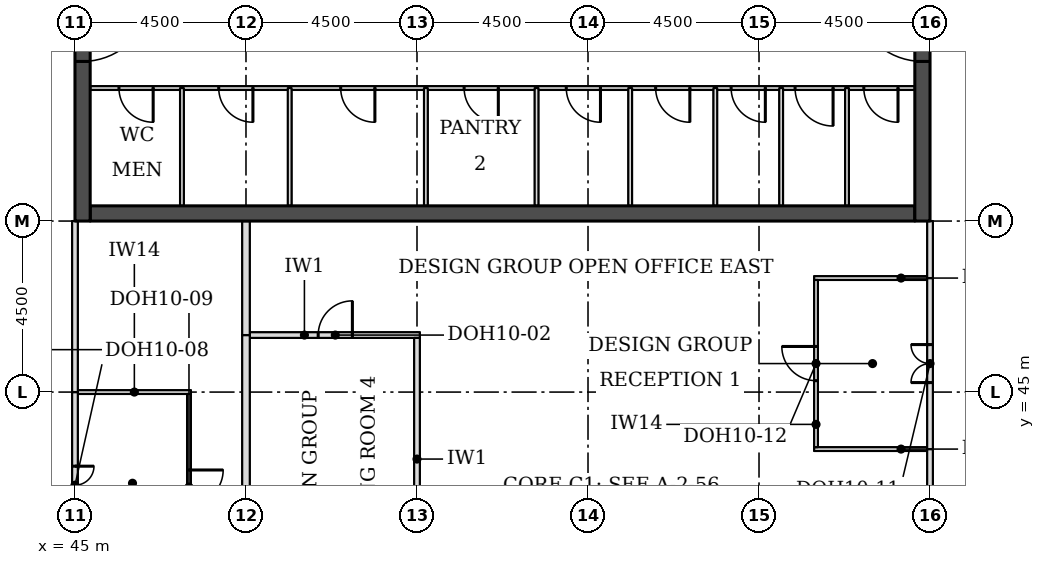
"""IFC4 building model, lengths in metres.
Left out: names, types, materials, properties, quantities, classifications, styles, units other than length and angle.
Written with IfcOpenShell. Run it as: python <this file> out.ifc"""

import sys

from ifc_helpers import new_model, si_unit, direction, frame, frame_2d, origin, place, context, subcontext, project, spatial, rectangle, extrude, element, fill, save


model = new_model("IFC4")
c1 = context("Model", 3, precision=1e-05, world=origin(), true_north=direction((0.0, 1.0)))
c2 = subcontext(c1, "Body", "Model", "MODEL_VIEW")
j1 = project(units=[si_unit("LENGTHUNIT", "METRE"), si_unit("PLANEANGLEUNIT", "RADIAN")], contexts=[c1])
p1 = place(None, origin())
s1 = spatial("IfcSite", under=j1, at=p1, CompositionType="ELEMENT")
p2 = place(p1, origin())
s2 = spatial("IfcBuilding", under=s1, at=p2, CompositionType="ELEMENT")
p3 = place(p2, frame((0.0, 0.0, 226.7)))
s3 = spatial("IfcBuildingStorey", under=s2, at=p3, CompositionType="ELEMENT", Elevation=226.7)
p4 = place(p3, frame((45.4, 49.7, 0.0), z_axis=(0.0, 0.0, 1.0), x_axis=(1.0, 0.0, 0.0)))
e1 = element("IfcWall", 1, at=p4, inside=s3, PredefinedType="SHEAR", context=c2, shape_type="SweptSolid", body=[
    extrude(rectangle(XDim=21.7, YDim=0.4, at=frame_2d((10.85, 0.0))), origin(), (0.0, 0.0, 1.0), 3.7),
])
p5 = place(p3, frame((45.2, 49.5, 0.0), z_axis=(0.0, 0.0, 1.0), x_axis=(0.0, 1.0, 0.0)))
e2 = element("IfcWall", 2, at=p5, inside=s3, PredefinedType="SHEAR", context=c2, shape_type="SweptSolid", body=[
    extrude(rectangle(XDim=22.5, YDim=0.4, at=frame_2d((11.25, 0.0))), origin(), (0.0, 0.0, 1.0), 3.7),
])
p6 = place(p5, frame((4.2, 0.0, 0.0)))
e3 = element("IfcOpeningElement", 3, at=p6, cuts=e2, PredefinedType="OPENING", context=c2, shape_type="SweptSolid", body=[
    extrude(rectangle(XDim=1.8, YDim=2.1, at=frame_2d((0.9, 1.05))), frame((0.0, 0.21, 0.0), z_axis=(0.0, -1.0, 0.0), x_axis=(1.0, 0.0, 0.0)), (0.0, 0.0, 1.0), 0.42),
])
p7 = place(p5, frame((6.9, 0.0, 0.0)))
e4 = element("IfcOpeningElement", 4, at=p7, cuts=e2, PredefinedType="OPENING", context=c2, shape_type="SweptSolid", body=[
    extrude(rectangle(XDim=1.1, YDim=2.1, at=frame_2d((0.55, 1.05))), frame((0.0, 0.21, 0.0), z_axis=(0.0, -1.0, 0.0), x_axis=(1.0, 0.0, 0.0)), (0.0, 0.0, 1.0), 0.42),
])
p8 = place(p5, frame((13.6, 0.0, 0.0)))
e5 = element("IfcOpeningElement", 5, at=p8, cuts=e2, PredefinedType="OPENING", context=c2, shape_type="SweptSolid", body=[
    extrude(rectangle(XDim=1.1, YDim=2.1, at=frame_2d((0.55, 1.05))), frame((0.0, 0.21, 0.0), z_axis=(0.0, -1.0, 0.0), x_axis=(1.0, 0.0, 0.0)), (0.0, 0.0, 1.0), 0.42),
])
p9 = place(p5, frame((16.5, 0.0, 0.0)))
e6 = element("IfcOpeningElement", 6, at=p9, cuts=e2, PredefinedType="OPENING", context=c2, shape_type="SweptSolid", body=[
    extrude(rectangle(XDim=1.8, YDim=2.1, at=frame_2d((0.9, 1.05))), frame((0.0, 0.21, 0.0), z_axis=(0.0, -1.0, 0.0), x_axis=(1.0, 0.0, 0.0)), (0.0, 0.0, 1.0), 0.42),
])
p10 = place(p3, frame((67.3, 49.5, 0.0), z_axis=(0.0, 0.0, 1.0), x_axis=(0.0, 1.0, 0.0)))
e7 = element("IfcWall", 7, at=p10, inside=s3, PredefinedType="SHEAR", context=c2, shape_type="SweptSolid", body=[
    extrude(rectangle(XDim=22.5, YDim=0.4, at=frame_2d((11.25, 0.0))), origin(), (0.0, 0.0, 1.0), 3.7),
])
p11 = place(p10, frame((4.2, 0.0, 0.0)))
e8 = element("IfcOpeningElement", 8, at=p11, cuts=e7, PredefinedType="OPENING", context=c2, shape_type="SweptSolid", body=[
    extrude(rectangle(XDim=1.8, YDim=2.1, at=frame_2d((0.9, 1.05))), frame((0.0, 0.21, 0.0), z_axis=(0.0, -1.0, 0.0), x_axis=(1.0, 0.0, 0.0)), (0.0, 0.0, 1.0), 0.42),
])
p12 = place(p10, frame((6.9, 0.0, 0.0)))
e9 = element("IfcOpeningElement", 9, at=p12, cuts=e7, PredefinedType="OPENING", context=c2, shape_type="SweptSolid", body=[
    extrude(rectangle(XDim=1.1, YDim=2.1, at=frame_2d((0.55, 1.05))), frame((0.0, 0.21, 0.0), z_axis=(0.0, -1.0, 0.0), x_axis=(1.0, 0.0, 0.0)), (0.0, 0.0, 1.0), 0.42),
])
p13 = place(p10, frame((13.6, 0.0, 0.0)))
e10 = element("IfcOpeningElement", 10, at=p13, cuts=e7, PredefinedType="OPENING", context=c2, shape_type="SweptSolid", body=[
    extrude(rectangle(XDim=1.1, YDim=2.1, at=frame_2d((0.55, 1.05))), frame((0.0, 0.21, 0.0), z_axis=(0.0, -1.0, 0.0), x_axis=(1.0, 0.0, 0.0)), (0.0, 0.0, 1.0), 0.42),
])
p14 = place(p10, frame((16.5, 0.0, 0.0)))
e11 = element("IfcOpeningElement", 11, at=p14, cuts=e7, PredefinedType="OPENING", context=c2, shape_type="SweptSolid", body=[
    extrude(rectangle(XDim=1.8, YDim=2.1, at=frame_2d((0.9, 1.05))), frame((0.0, 0.21, 0.0), z_axis=(0.0, -1.0, 0.0), x_axis=(1.0, 0.0, 0.0)), (0.0, 0.0, 1.0), 0.42),
])
for number, where, z_axis, x_axis in (
    (12, (64.45, 43.5, 0.0), (0.0, 0.0, 1.0), (1.0, 0.0, 0.0)),
    (13, (45.075, 45.0, 0.0), (0.0, 0.0, 1.0), (1.0, 0.0, 0.0)),
):
    element("IfcWall", number, at=place(p3, frame(where, z_axis=z_axis, x_axis=x_axis)), inside=s3, PredefinedType="PARTITIONING", context=c2, shape_type="SweptSolid", body=[
        extrude(rectangle(XDim=2.975, YDim=0.1, at=frame_2d((1.488, 0.0))), origin(), (0.0, 0.0, 1.0), 3.55),
    ])
p15 = place(p3, frame((49.6, 46.5, 0.0), z_axis=(0.0, 0.0, 1.0), x_axis=(1.0, 0.0, 0.0)))
e14 = element("IfcWall", 14, at=p15, inside=s3, PredefinedType="PARTITIONING", context=c2, shape_type="SweptSolid", body=[
    extrude(rectangle(XDim=4.475, YDim=0.15, at=frame_2d((2.237, 0.0))), origin(), (0.0, 0.0, 1.0), 3.55),
])
p16 = place(p15, frame((1.8, 0.0, 0.0)))
e15 = element("IfcOpeningElement", 15, at=p16, cuts=e14, PredefinedType="OPENING", context=c2, shape_type="SweptSolid", body=[
    extrude(rectangle(XDim=0.9, YDim=2.1, at=frame_2d((0.45, 1.05))), frame((0.0, 0.085, 0.0), z_axis=(0.0, -1.0, 0.0), x_axis=(1.0, 0.0, 0.0)), (0.0, 0.0, 1.0), 0.17),
])
p17 = place(p3, frame((64.45, 48.0, 0.0), z_axis=(0.0, 0.0, 1.0), x_axis=(1.0, 0.0, 0.0)))
e16 = element("IfcWall", 16, at=p17, inside=s3, PredefinedType="PARTITIONING", context=c2, shape_type="SweptSolid", body=[
    extrude(rectangle(XDim=2.975, YDim=0.1, at=frame_2d((1.488, 0.0))), origin(), (0.0, 0.0, 1.0), 3.55),
])
p18 = place(p3, frame((45.0, 40.05, 0.0), z_axis=(0.0, 0.0, 1.0), x_axis=(0.0, 1.0, 0.0)))
e17 = element("IfcWall", 17, at=p18, inside=s3, PredefinedType="PARTITIONING", context=c2, shape_type="SweptSolid", body=[
    extrude(rectangle(XDim=4.95, YDim=0.15, at=frame_2d((2.475, 0.0))), origin(), (0.0, 0.0, 1.0), 3.022),
])
p19 = place(p18, frame((2.0, 0.0, 0.0)))
e18 = element("IfcOpeningElement", 18, at=p19, cuts=e17, PredefinedType="OPENING", context=c2, shape_type="SweptSolid", body=[
    extrude(rectangle(XDim=1.0, YDim=2.1, at=frame_2d((0.5, 1.05))), frame((0.0, 0.085, 0.0), z_axis=(0.0, -1.0, 0.0), x_axis=(1.0, 0.0, 0.0)), (0.0, 0.0, 1.0), 0.17),
])
p20 = place(p3, frame((48.0, 40.05, 0.0), z_axis=(0.0, 0.0, 1.0), x_axis=(0.0, 1.0, 0.0)))
e19 = element("IfcWall", 19, at=p20, inside=s3, PredefinedType="PARTITIONING", context=c2, shape_type="SweptSolid", body=[
    extrude(rectangle(XDim=4.9, YDim=0.1, at=frame_2d((2.45, 0.0))), origin(), (0.0, 0.0, 1.0), 3.55),
])
p21 = place(p20, frame((2.0, 0.0, 0.0)))
e20 = element("IfcOpeningElement", 20, at=p21, cuts=e19, PredefinedType="OPENING", context=c2, shape_type="SweptSolid", body=[
    extrude(rectangle(XDim=0.9, YDim=2.1, at=frame_2d((0.45, 1.05))), frame((0.0, 0.06, 0.0), z_axis=(0.0, -1.0, 0.0), x_axis=(1.0, 0.0, 0.0)), (0.0, 0.0, 1.0), 0.12),
])
p22 = place(p3, frame((49.5, 40.05, 0.0), z_axis=(0.0, 0.0, 1.0), x_axis=(0.0, 1.0, 0.0)))
e21 = element("IfcWall", 21, at=p22, inside=s3, PredefinedType="PARTITIONING", context=c2, shape_type="SweptSolid", body=[
    extrude(rectangle(XDim=6.45, YDim=0.2, at=frame_2d((3.225, 0.0))), origin(), (0.0, 0.0, 1.0), 3.55),
])
p23 = place(p3, frame((54.0, 40.05, 0.0), z_axis=(0.0, 0.0, 1.0), x_axis=(0.0, 1.0, 0.0)))
e22 = element("IfcWall", 22, at=p23, inside=s3, PredefinedType="PARTITIONING", context=c2, shape_type="SweptSolid", body=[
    extrude(rectangle(XDim=6.375, YDim=0.15, at=frame_2d((3.188, 0.0))), origin(), (0.0, 0.0, 1.0), 3.55),
])
p24 = place(p3, frame((67.5, 40.05, 0.0), z_axis=(0.0, 0.0, 1.0), x_axis=(0.0, 1.0, 0.0)))
e23 = element("IfcWall", 23, at=p24, inside=s3, PredefinedType="PARTITIONING", context=c2, shape_type="SweptSolid", body=[
    extrude(rectangle(XDim=3.45, YDim=0.15, at=frame_2d((1.725, 0.0))), origin(), (0.0, 0.0, 1.0), 3.022),
])
p25 = place(p3, frame((67.5, 43.5, 0.0), z_axis=(0.0, 0.0, 1.0), x_axis=(0.0, 1.0, 0.0)))
e24 = element("IfcWall", 24, at=p25, inside=s3, PredefinedType="PARTITIONING", context=c2, shape_type="SweptSolid", body=[
    extrude(rectangle(XDim=4.5, YDim=0.15, at=frame_2d((2.25, 0.0))), origin(), (0.0, 0.0, 1.0), 3.022),
])
p26 = place(p25, frame((1.75, 0.0, 0.0)))
e25 = element("IfcOpeningElement", 25, at=p26, cuts=e24, PredefinedType="OPENING", context=c2, shape_type="SweptSolid", body=[
    extrude(rectangle(XDim=1.0, YDim=2.1, at=frame_2d((0.5, 1.05))), frame((0.0, 0.085, 0.0), z_axis=(0.0, -1.0, 0.0), x_axis=(1.0, 0.0, 0.0)), (0.0, 0.0, 1.0), 0.17),
])
p27 = place(p3, frame((64.5, 43.55, 0.0), z_axis=(0.0, 0.0, 1.0), x_axis=(0.0, 1.0, 0.0)))
e26 = element("IfcWall", 26, at=p27, inside=s3, PredefinedType="PARTITIONING", context=c2, shape_type="SweptSolid", body=[
    extrude(rectangle(XDim=4.4, YDim=0.1, at=frame_2d((2.2, 0.0))), origin(), (0.0, 0.0, 1.0), 3.55),
])
p28 = place(p27, frame((1.75, 0.0, 0.0)))
e27 = element("IfcOpeningElement", 27, at=p28, cuts=e26, PredefinedType="OPENING", context=c2, shape_type="SweptSolid", body=[
    extrude(rectangle(XDim=0.9, YDim=2.1, at=frame_2d((0.45, 1.05))), frame((0.0, 0.06, 0.0), z_axis=(0.0, -1.0, 0.0), x_axis=(1.0, 0.0, 0.0)), (0.0, 0.0, 1.0), 0.12),
])
p29 = place(p3, frame((45.0, 45.0, 0.0), z_axis=(0.0, 0.0, 1.0), x_axis=(0.0, 1.0, 0.0)))
e28 = element("IfcWall", 28, at=p29, inside=s3, PredefinedType="PARTITIONING", context=c2, shape_type="SweptSolid", body=[
    extrude(rectangle(XDim=4.5, YDim=0.15, at=frame_2d((2.25, 0.0))), origin(), (0.0, 0.0, 1.0), 3.022),
])
p30 = place(p3, frame((49.5, 46.5, 0.0), z_axis=(0.0, 0.0, 1.0), x_axis=(0.0, 1.0, 0.0)))
e29 = element("IfcWall", 29, at=p30, inside=s3, PredefinedType="PARTITIONING", context=c2, shape_type="SweptSolid", body=[
    extrude(rectangle(XDim=3.0, YDim=0.2, at=frame_2d((1.5, 0.0))), origin(), (0.0, 0.0, 1.0), 3.55),
])
p31 = place(p3, frame((67.5, 48.0, 0.0), z_axis=(0.0, 0.0, 1.0), x_axis=(0.0, 1.0, 0.0)))
e30 = element("IfcWall", 30, at=p31, inside=s3, PredefinedType="PARTITIONING", context=c2, shape_type="SweptSolid", body=[
    extrude(rectangle(XDim=1.5, YDim=0.15, at=frame_2d((0.75, 0.0))), origin(), (0.0, 0.0, 1.0), 3.022),
])
p32 = place(p3, frame((45.4, 53.0, 0.0), z_axis=(0.0, 0.0, 1.0), x_axis=(1.0, 0.0, 0.0)))
e31 = element("IfcWall", 31, at=p32, inside=s3, PredefinedType="PARTITIONING", context=c2, shape_type="SweptSolid", body=[
    extrude(rectangle(XDim=21.7, YDim=0.1, at=frame_2d((10.85, 0.0))), origin(), (0.0, 0.0, 1.0), 3.55),
])
p33 = place(p32, frame((20.357, 0.0, 0.0)))
e32 = element("IfcOpeningElement", 32, at=p33, cuts=e31, PredefinedType="OPENING", context=c2, shape_type="SweptSolid", body=[
    extrude(rectangle(XDim=0.9, YDim=2.1, at=frame_2d((0.45, 1.05))), frame((0.0, 0.06, 0.0), z_axis=(0.0, -1.0, 0.0), x_axis=(1.0, 0.0, 0.0)), (0.0, 0.0, 1.0), 0.12),
])
p34 = place(p32, frame((18.549, 0.0, 0.0)))
e33 = element("IfcOpeningElement", 33, at=p34, cuts=e31, PredefinedType="OPENING", context=c2, shape_type="SweptSolid", body=[
    extrude(rectangle(XDim=1.0, YDim=2.1, at=frame_2d((0.5, 1.05))), frame((0.0, 0.06, 0.0), z_axis=(0.0, -1.0, 0.0), x_axis=(1.0, 0.0, 0.0)), (0.0, 0.0, 1.0), 0.12),
])
p35 = place(p32, frame((16.866, 0.0, 0.0)))
e34 = element("IfcOpeningElement", 34, at=p35, cuts=e31, PredefinedType="OPENING", context=c2, shape_type="SweptSolid", body=[
    extrude(rectangle(XDim=0.9, YDim=2.1, at=frame_2d((0.45, 1.05))), frame((0.0, 0.06, 0.0), z_axis=(0.0, -1.0, 0.0), x_axis=(1.0, 0.0, 0.0)), (0.0, 0.0, 1.0), 0.12),
])
p36 = place(p32, frame((0.758, 0.0, 0.0)))
e35 = element("IfcOpeningElement", 35, at=p36, cuts=e31, PredefinedType="OPENING", context=c2, shape_type="SweptSolid", body=[
    extrude(rectangle(XDim=0.9, YDim=2.1, at=frame_2d((0.45, 1.05))), frame((0.0, 0.06, 0.0), z_axis=(0.0, -1.0, 0.0), x_axis=(1.0, 0.0, 0.0)), (0.0, 0.0, 1.0), 0.12),
])
p37 = place(p32, frame((3.383, 0.0, 0.0)))
e36 = element("IfcOpeningElement", 36, at=p37, cuts=e31, PredefinedType="OPENING", context=c2, shape_type="SweptSolid", body=[
    extrude(rectangle(XDim=0.9, YDim=2.1, at=frame_2d((0.45, 1.05))), frame((0.0, 0.06, 0.0), z_axis=(0.0, -1.0, 0.0), x_axis=(1.0, 0.0, 0.0)), (0.0, 0.0, 1.0), 0.12),
])
p38 = place(p32, frame((6.592, 0.0, 0.0)))
e37 = element("IfcOpeningElement", 37, at=p38, cuts=e31, PredefinedType="OPENING", context=c2, shape_type="SweptSolid", body=[
    extrude(rectangle(XDim=0.9, YDim=2.1, at=frame_2d((0.45, 1.05))), frame((0.0, 0.06, 0.0), z_axis=(0.0, -1.0, 0.0), x_axis=(1.0, 0.0, 0.0)), (0.0, 0.0, 1.0), 0.12),
])
p39 = place(p32, frame((9.84, 0.0, 0.0)))
e38 = element("IfcOpeningElement", 38, at=p39, cuts=e31, PredefinedType="OPENING", context=c2, shape_type="SweptSolid", body=[
    extrude(rectangle(XDim=0.9, YDim=2.1, at=frame_2d((0.45, 1.05))), frame((0.0, 0.06, 0.0), z_axis=(0.0, -1.0, 0.0), x_axis=(1.0, 0.0, 0.0)), (0.0, 0.0, 1.0), 0.12),
])
p40 = place(p32, frame((12.528, 0.0, 0.0)))
e39 = element("IfcOpeningElement", 39, at=p40, cuts=e31, PredefinedType="OPENING", context=c2, shape_type="SweptSolid", body=[
    extrude(rectangle(XDim=0.9, YDim=2.1, at=frame_2d((0.45, 1.05))), frame((0.0, 0.06, 0.0), z_axis=(0.0, -1.0, 0.0), x_axis=(1.0, 0.0, 0.0)), (0.0, 0.0, 1.0), 0.12),
])
p41 = place(p32, frame((14.88, 0.0, 0.0)))
e40 = element("IfcOpeningElement", 40, at=p41, cuts=e31, PredefinedType="OPENING", context=c2, shape_type="SweptSolid", body=[
    extrude(rectangle(XDim=0.9, YDim=2.1, at=frame_2d((0.45, 1.05))), frame((0.0, 0.06, 0.0), z_axis=(0.0, -1.0, 0.0), x_axis=(1.0, 0.0, 0.0)), (0.0, 0.0, 1.0), 0.12),
])
for number, where, z_axis, x_axis in (
    (41, (47.815, 49.9, 0.0), (0.0, 0.0, 1.0), (0.0, 1.0, 0.0)),
    (42, (50.65, 49.9, 0.0), (0.0, 0.0, 1.0), (0.0, 1.0, 0.0)),
    (43, (54.234, 49.9, 0.0), (0.0, 0.0, 1.0), (0.0, 1.0, 0.0)),
    (44, (57.146, 49.9, 0.0), (0.0, 0.0, 1.0), (0.0, 1.0, 0.0)),
    (45, (59.61, 49.9, 0.0), (0.0, 0.0, 1.0), (0.0, 1.0, 0.0)),
    (46, (61.85, 49.9, 0.0), (0.0, 0.0, 1.0), (0.0, 1.0, 0.0)),
    (47, (63.583, 49.9, 0.0), (0.0, 0.0, 1.0), (0.0, 1.0, 0.0)),
    (48, (65.315, 49.9, 0.0), (0.0, 0.0, 1.0), (0.0, 1.0, 0.0)),
):
    element("IfcWall", number, at=place(p3, frame(where, z_axis=z_axis, x_axis=x_axis)), inside=s3, PredefinedType="PARTITIONING", context=c2, shape_type="SweptSolid", body=[
        extrude(rectangle(XDim=3.1, YDim=0.1, at=frame_2d((1.55, 0.0))), origin(), (0.0, 0.0, 1.0), 3.55),
    ])
p42 = place(p19, frame((1.0, 0.0, 0.0), z_axis=(0.0, 0.0, 1.0), x_axis=(-1.0, 0.0, 0.0)))
e49 = element("IfcDoor", 49, at=p42, inside=s3, OperationType="DOUBLE_DOOR_SINGLE_SWING", PredefinedType="DOOR", context=c2, shape_type="SweptSolid", body=[
    extrude(rectangle(XDim=1.0, YDim=2.1, at=frame_2d((0.5, 1.05))), frame((0.0, 0.025, 0.0), z_axis=(0.0, -1.0, 0.0), x_axis=(1.0, 0.0, 0.0)), (0.0, 0.0, 1.0), 0.05),
])
fill(e18, e49)
p43 = place(p21, frame((0.9, 0.0, 0.0), z_axis=(0.0, 0.0, 1.0), x_axis=(-1.0, 0.0, 0.0)))
e50 = element("IfcDoor", 50, at=p43, inside=s3, OperationType="SINGLE_SWING_LEFT", PredefinedType="DOOR", context=c2, shape_type="SweptSolid", body=[
    extrude(rectangle(XDim=0.9, YDim=2.1, at=frame_2d((0.45, 1.05))), frame((0.0, 0.025, 0.0), z_axis=(0.0, -1.0, 0.0), x_axis=(1.0, 0.0, 0.0)), (0.0, 0.0, 1.0), 0.05),
])
fill(e20, e50)
p44 = place(p26, origin())
e51 = element("IfcDoor", 51, at=p44, inside=s3, OperationType="DOUBLE_DOOR_SINGLE_SWING", PredefinedType="DOOR", context=c2, shape_type="SweptSolid", body=[
    extrude(rectangle(XDim=1.0, YDim=2.1, at=frame_2d((0.5, 1.05))), frame((0.0, 0.025, 0.0), z_axis=(0.0, -1.0, 0.0), x_axis=(1.0, 0.0, 0.0)), (0.0, 0.0, 1.0), 0.05),
])
fill(e25, e51)
p45 = place(p28, origin())
e52 = element("IfcDoor", 52, at=p45, inside=s3, OperationType="SINGLE_SWING_RIGHT", PredefinedType="DOOR", context=c2, shape_type="SweptSolid", body=[
    extrude(rectangle(XDim=0.9, YDim=2.1, at=frame_2d((0.45, 1.05))), frame((0.0, 0.025, 0.0), z_axis=(0.0, -1.0, 0.0), x_axis=(1.0, 0.0, 0.0)), (0.0, 0.0, 1.0), 0.05),
])
fill(e27, e52)
p46 = place(p16, origin())
e53 = element("IfcDoor", 53, at=p46, inside=s3, OperationType="SINGLE_SWING_RIGHT", PredefinedType="DOOR", context=c2, shape_type="SweptSolid", body=[
    extrude(rectangle(XDim=0.9, YDim=2.1, at=frame_2d((0.45, 1.05))), frame((0.0, 0.025, 0.0), z_axis=(0.0, -1.0, 0.0), x_axis=(1.0, 0.0, 0.0)), (0.0, 0.0, 1.0), 0.05),
])
fill(e15, e53)
p47 = place(p6, frame((1.8, 0.0, 0.0), z_axis=(0.0, 0.0, 1.0), x_axis=(-1.0, 0.0, 0.0)))
e54 = element("IfcDoor", 54, at=p47, inside=s3, OperationType="SINGLE_SWING_LEFT", PredefinedType="DOOR", context=c2, shape_type="SweptSolid", body=[
    extrude(rectangle(XDim=1.8, YDim=2.1, at=frame_2d((0.9, 1.05))), frame((0.0, 0.025, 0.0), z_axis=(0.0, -1.0, 0.0), x_axis=(1.0, 0.0, 0.0)), (0.0, 0.0, 1.0), 0.05),
])
fill(e3, e54)
p48 = place(p11, origin())
e55 = element("IfcDoor", 55, at=p48, inside=s3, OperationType="SINGLE_SWING_RIGHT", PredefinedType="DOOR", context=c2, shape_type="SweptSolid", body=[
    extrude(rectangle(XDim=1.8, YDim=2.1, at=frame_2d((0.9, 1.05))), frame((0.0, 0.025, 0.0), z_axis=(0.0, -1.0, 0.0), x_axis=(1.0, 0.0, 0.0)), (0.0, 0.0, 1.0), 0.05),
])
fill(e8, e55)
p49 = place(p33, frame((0.9, 0.0, 0.0), z_axis=(0.0, 0.0, 1.0), x_axis=(-1.0, 0.0, 0.0)))
e56 = element("IfcDoor", 56, at=p49, inside=s3, OperationType="SINGLE_SWING_LEFT", PredefinedType="DOOR", context=c2, shape_type="SweptSolid", body=[
    extrude(rectangle(XDim=0.9, YDim=2.1, at=frame_2d((0.45, 1.05))), frame((0.0, 0.025, 0.0), z_axis=(0.0, -1.0, 0.0), x_axis=(1.0, 0.0, 0.0)), (0.0, 0.0, 1.0), 0.05),
])
fill(e32, e56)
p50 = place(p34, frame((1.0, 0.0, 0.0), z_axis=(0.0, 0.0, 1.0), x_axis=(-1.0, 0.0, 0.0)))
e57 = element("IfcDoor", 57, at=p50, inside=s3, OperationType="SINGLE_SWING_LEFT", PredefinedType="DOOR", context=c2, shape_type="SweptSolid", body=[
    extrude(rectangle(XDim=1.0, YDim=2.1, at=frame_2d((0.5, 1.05))), frame((0.0, 0.025, 0.0), z_axis=(0.0, -1.0, 0.0), x_axis=(1.0, 0.0, 0.0)), (0.0, 0.0, 1.0), 0.05),
])
fill(e33, e57)
p51 = place(p35, frame((0.9, 0.0, 0.0), z_axis=(0.0, 0.0, 1.0), x_axis=(-1.0, 0.0, 0.0)))
e58 = element("IfcDoor", 58, at=p51, inside=s3, OperationType="SINGLE_SWING_LEFT", PredefinedType="DOOR", context=c2, shape_type="SweptSolid", body=[
    extrude(rectangle(XDim=0.9, YDim=2.1, at=frame_2d((0.45, 1.05))), frame((0.0, 0.025, 0.0), z_axis=(0.0, -1.0, 0.0), x_axis=(1.0, 0.0, 0.0)), (0.0, 0.0, 1.0), 0.05),
])
fill(e34, e58)
p52 = place(p36, frame((0.9, 0.0, 0.0), z_axis=(0.0, 0.0, 1.0), x_axis=(-1.0, 0.0, 0.0)))
e59 = element("IfcDoor", 59, at=p52, inside=s3, OperationType="SINGLE_SWING_LEFT", PredefinedType="DOOR", context=c2, shape_type="SweptSolid", body=[
    extrude(rectangle(XDim=0.9, YDim=2.1, at=frame_2d((0.45, 1.05))), frame((0.0, 0.025, 0.0), z_axis=(0.0, -1.0, 0.0), x_axis=(1.0, 0.0, 0.0)), (0.0, 0.0, 1.0), 0.05),
])
fill(e35, e59)
p53 = place(p37, frame((0.9, 0.0, 0.0), z_axis=(0.0, 0.0, 1.0), x_axis=(-1.0, 0.0, 0.0)))
e60 = element("IfcDoor", 60, at=p53, inside=s3, OperationType="SINGLE_SWING_LEFT", PredefinedType="DOOR", context=c2, shape_type="SweptSolid", body=[
    extrude(rectangle(XDim=0.9, YDim=2.1, at=frame_2d((0.45, 1.05))), frame((0.0, 0.025, 0.0), z_axis=(0.0, -1.0, 0.0), x_axis=(1.0, 0.0, 0.0)), (0.0, 0.0, 1.0), 0.05),
])
fill(e36, e60)
p54 = place(p38, frame((0.9, 0.0, 0.0), z_axis=(0.0, 0.0, 1.0), x_axis=(-1.0, 0.0, 0.0)))
e61 = element("IfcDoor", 61, at=p54, inside=s3, OperationType="SINGLE_SWING_LEFT", PredefinedType="DOOR", context=c2, shape_type="SweptSolid", body=[
    extrude(rectangle(XDim=0.9, YDim=2.1, at=frame_2d((0.45, 1.05))), frame((0.0, 0.025, 0.0), z_axis=(0.0, -1.0, 0.0), x_axis=(1.0, 0.0, 0.0)), (0.0, 0.0, 1.0), 0.05),
])
fill(e37, e61)
p55 = place(p39, frame((0.9, 0.0, 0.0), z_axis=(0.0, 0.0, 1.0), x_axis=(-1.0, 0.0, 0.0)))
e62 = element("IfcDoor", 62, at=p55, inside=s3, OperationType="SINGLE_SWING_LEFT", PredefinedType="DOOR", context=c2, shape_type="SweptSolid", body=[
    extrude(rectangle(XDim=0.9, YDim=2.1, at=frame_2d((0.45, 1.05))), frame((0.0, 0.025, 0.0), z_axis=(0.0, -1.0, 0.0), x_axis=(1.0, 0.0, 0.0)), (0.0, 0.0, 1.0), 0.05),
])
fill(e38, e62)
p56 = place(p40, frame((0.9, 0.0, 0.0), z_axis=(0.0, 0.0, 1.0), x_axis=(-1.0, 0.0, 0.0)))
e63 = element("IfcDoor", 63, at=p56, inside=s3, OperationType="SINGLE_SWING_LEFT", PredefinedType="DOOR", context=c2, shape_type="SweptSolid", body=[
    extrude(rectangle(XDim=0.9, YDim=2.1, at=frame_2d((0.45, 1.05))), frame((0.0, 0.025, 0.0), z_axis=(0.0, -1.0, 0.0), x_axis=(1.0, 0.0, 0.0)), (0.0, 0.0, 1.0), 0.05),
])
fill(e39, e63)
p57 = place(p41, frame((0.9, 0.0, 0.0), z_axis=(0.0, 0.0, 1.0), x_axis=(-1.0, 0.0, 0.0)))
e64 = element("IfcDoor", 64, at=p57, inside=s3, OperationType="SINGLE_SWING_LEFT", PredefinedType="DOOR", context=c2, shape_type="SweptSolid", body=[
    extrude(rectangle(XDim=0.9, YDim=2.1, at=frame_2d((0.45, 1.05))), frame((0.0, 0.025, 0.0), z_axis=(0.0, -1.0, 0.0), x_axis=(1.0, 0.0, 0.0)), (0.0, 0.0, 1.0), 0.05),
])
fill(e40, e64)
save(model, sys.argv[1])
